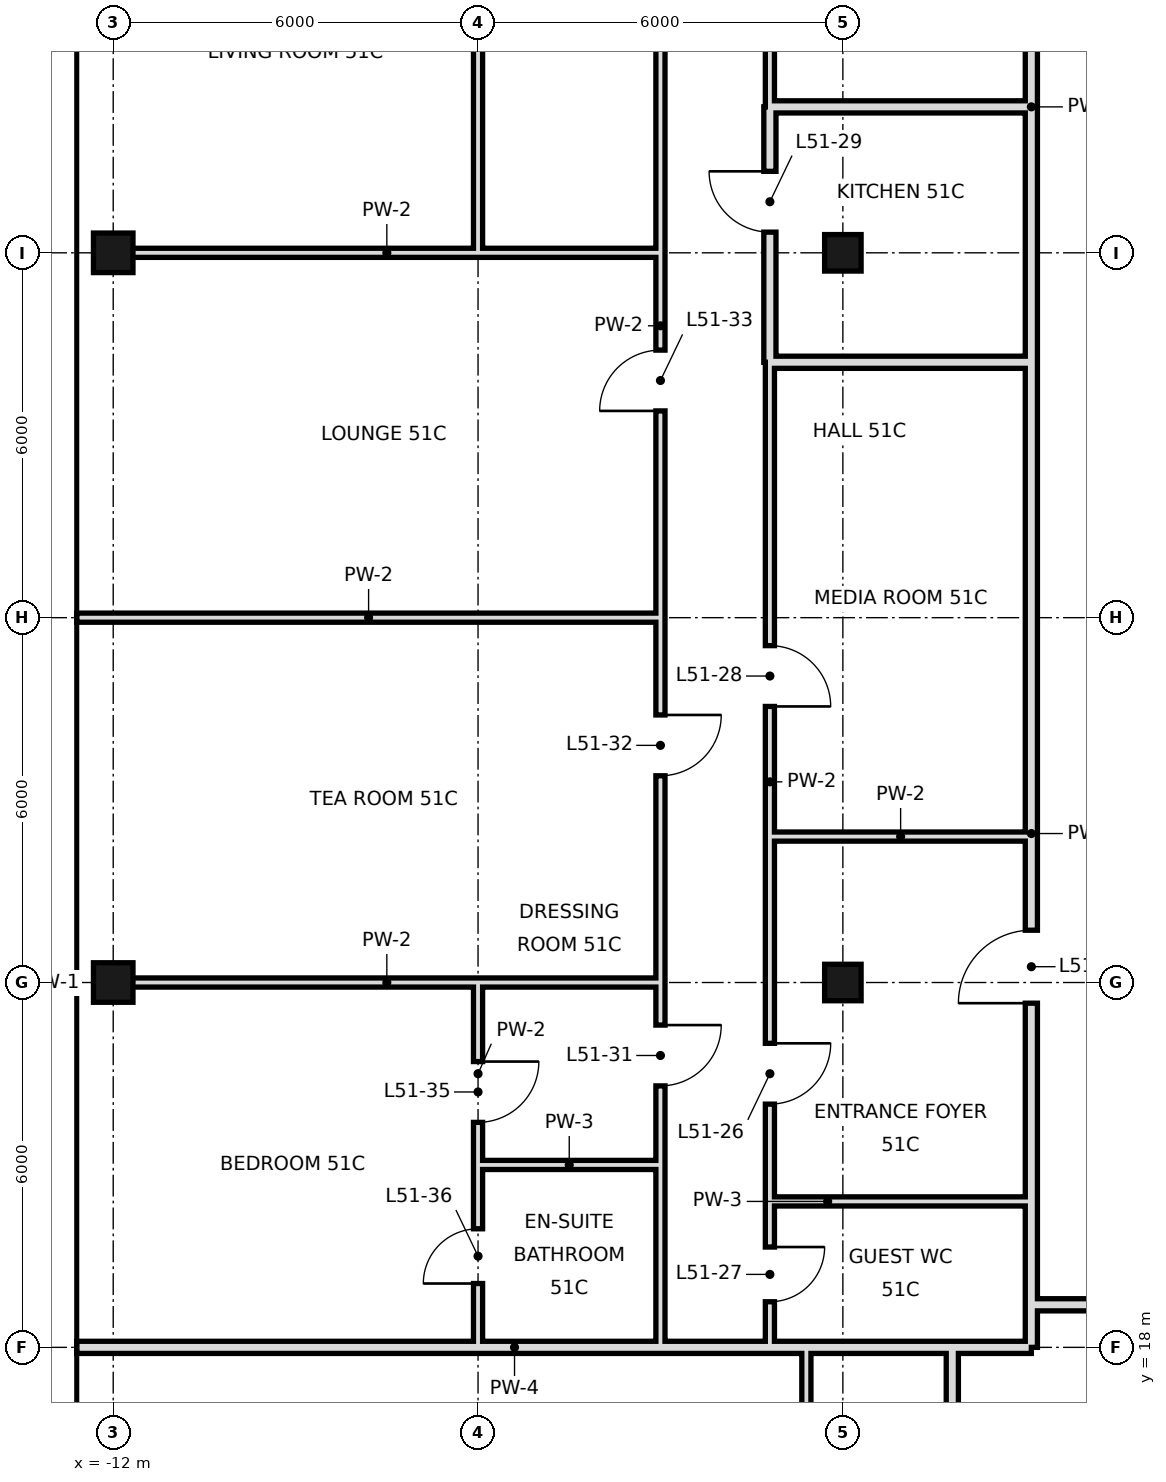
"""IFC4 building model, lengths in metres.
Left out: names, types, materials, properties, quantities, classifications, styles, units other than length and angle.
Written with IfcOpenShell. Run it as: python <this file> out.ifc"""

import sys

from ifc_helpers import new_model, si_unit, direction, frame, frame_2d, origin, origin_2d, place, context, subcontext, project, spatial, rectangle, hollow_rectangle, extrude, element, fill, save


model = new_model("IFC4")
c1 = context("Model", 3, precision=1e-05, world=origin(), true_north=direction((0.0, 1.0)))
c2 = subcontext(c1, "Body", "Model", "MODEL_VIEW")
j1 = project(units=[si_unit("LENGTHUNIT", "METRE"), si_unit("PLANEANGLEUNIT", "RADIAN")], contexts=[c1])
p1 = place(None, origin())
s1 = spatial("IfcSite", under=j1, at=p1, CompositionType="ELEMENT")
p2 = place(p1, origin())
s2 = spatial("IfcBuilding", under=s1, at=p2, CompositionType="ELEMENT")
p3 = place(p2, frame((0.0, 0.0, 219.0)))
s3 = spatial("IfcBuildingStorey", under=s2, at=p3, CompositionType="ELEMENT", Elevation=219.0)
for number, where, z_axis, x_axis in (
    (1, (-12.0, 24.0, 0.0), (0.0, 0.0, 1.0), (1.0, 0.0, 0.0)),
    (2, (-12.0, 36.0, 0.0), (0.0, 0.0, 1.0), (1.0, 0.0, 0.0)),
):
    element("IfcColumn", number, at=place(p3, frame(where, z_axis=z_axis, x_axis=x_axis)), inside=s3, PredefinedType="COLUMN", context=c2, shape_type="SweptSolid", body=[
        extrude(hollow_rectangle(XDim=0.65, YDim=0.65, WallThickness=0.032, at=origin_2d()), origin(), (0.0, 0.0, 1.0), 3.6),
    ])
for number, where, z_axis, x_axis in (
    (3, (0.0, 24.0, 0.0), (0.0, 0.0, 1.0), (1.0, 0.0, 0.0)),
    (4, (0.0, 36.0, 0.0), (0.0, 0.0, 1.0), (1.0, 0.0, 0.0)),
):
    element("IfcColumn", number, at=place(p3, frame(where, z_axis=z_axis, x_axis=x_axis)), inside=s3, PredefinedType="COLUMN", context=c2, shape_type="SweptSolid", body=[
        extrude(hollow_rectangle(XDim=0.6, YDim=0.6, WallThickness=0.028, at=origin_2d()), origin(), (0.0, 0.0, 1.0), 3.6),
    ])
p4 = place(p3, frame((-0.6, 10.8, 0.0), z_axis=(0.0, 0.0, 1.0), x_axis=(0.0, 1.0, 0.0)))
e5 = element("IfcWall", 5, at=p4, inside=s3, PredefinedType="PARTITIONING", context=c2, shape_type="SweptSolid", body=[
    extrude(rectangle(XDim=7.2, YDim=0.15, at=frame_2d((3.6, 0.0))), origin(), (0.0, 0.0, 1.0), 3.42),
])
p5 = place(p3, frame((-1.2, 34.2, 0.0), z_axis=(0.0, 0.0, 1.0), x_axis=(0.0, 1.0, 0.0)))
e6 = element("IfcWall", 6, at=p5, inside=s3, PredefinedType="SOLIDWALL", context=c2, shape_type="SweptSolid", body=[
    extrude(rectangle(XDim=4.2, YDim=0.2, at=frame_2d((2.1, 0.0))), origin(), (0.0, 0.0, 1.0), 2.72),
])
p6 = place(p5, frame((2.14, 0.0, 0.0)))
e7 = element("IfcOpeningElement", 7, at=p6, cuts=e6, PredefinedType="OPENING", context=c2, shape_type="SweptSolid", body=[
    extrude(rectangle(XDim=1.0, YDim=2.4, at=frame_2d((0.5, 1.2))), frame((0.0, 0.11, 0.0), z_axis=(0.0, -1.0, 0.0), x_axis=(1.0, 0.0, 0.0)), (0.0, 0.0, 1.0), 0.22),
])
p7 = place(p3, frame((-1.2, 20.4, 0.0), z_axis=(0.0, 0.0, 1.0), x_axis=(0.0, 1.0, 0.0)))
e8 = element("IfcWall", 8, at=p7, inside=s3, PredefinedType="PARTITIONING", context=c2, shape_type="SweptSolid", body=[
    extrude(rectangle(XDim=13.8, YDim=0.15, at=frame_2d((6.9, 0.0))), origin(), (0.0, 0.0, 1.0), 3.42),
])
p8 = place(p7, frame((1.6, 0.0, 0.0)))
e9 = element("IfcOpeningElement", 9, at=p8, cuts=e8, PredefinedType="OPENING", context=c2, shape_type="SweptSolid", body=[
    extrude(rectangle(XDim=1.0, YDim=2.4, at=frame_2d((0.5, 1.2))), frame((0.0, 0.085, 0.0), z_axis=(0.0, -1.0, 0.0), x_axis=(1.0, 0.0, 0.0)), (0.0, 0.0, 1.0), 0.17),
])
p9 = place(p7, frame((8.14, 0.0, 0.0)))
e10 = element("IfcOpeningElement", 10, at=p9, cuts=e8, PredefinedType="OPENING", context=c2, shape_type="SweptSolid", body=[
    extrude(rectangle(XDim=1.0, YDim=2.4, at=frame_2d((0.5, 1.2))), frame((0.0, 0.085, 0.0), z_axis=(0.0, -1.0, 0.0), x_axis=(1.0, 0.0, 0.0)), (0.0, 0.0, 1.0), 0.17),
])
p10 = place(p3, frame((-1.2, 38.4, 0.0), z_axis=(0.0, 0.0, 1.0), x_axis=(0.0, 1.0, 0.0)))
e11 = element("IfcWall", 11, at=p10, inside=s3, PredefinedType="PARTITIONING", context=c2, shape_type="SweptSolid", body=[
    extrude(rectangle(XDim=10.2, YDim=0.15, at=frame_2d((5.1, 0.0))), origin(), (0.0, 0.0, 1.0), 3.42),
])
p11 = place(p10, frame((5.92, 0.0, 0.0)))
e12 = element("IfcOpeningElement", 12, at=p11, cuts=e11, PredefinedType="OPENING", context=c2, shape_type="SweptSolid", body=[
    extrude(rectangle(XDim=1.0, YDim=2.4, at=frame_2d((0.5, 1.2))), frame((0.0, 0.085, 0.0), z_axis=(0.0, -1.0, 0.0), x_axis=(1.0, 0.0, 0.0)), (0.0, 0.0, 1.0), 0.17),
])
p12 = place(p3, frame((-1.2, 18.0, 0.0), z_axis=(0.0, 0.0, 1.0), x_axis=(0.0, 1.0, 0.0)))
e13 = element("IfcWall", 13, at=p12, inside=s3, PredefinedType="PARTITIONING", context=c2, shape_type="SweptSolid", body=[
    extrude(rectangle(XDim=2.4, YDim=0.15, at=frame_2d((1.2, 0.0))), origin(), (0.0, 0.0, 1.0), 3.42),
])
p13 = place(p12, frame((0.75, 0.0, 0.0)))
e14 = element("IfcOpeningElement", 14, at=p13, cuts=e13, PredefinedType="OPENING", context=c2, shape_type="SweptSolid", body=[
    extrude(rectangle(XDim=0.9, YDim=2.4, at=frame_2d((0.45, 1.2))), frame((0.0, 0.085, 0.0), z_axis=(0.0, -1.0, 0.0), x_axis=(1.0, 0.0, 0.0)), (0.0, 0.0, 1.0), 0.17),
])
p14 = place(p3, frame((-3.0, 21.0, 0.0), z_axis=(0.0, 0.0, 1.0), x_axis=(0.0, 1.0, 0.0)))
e15 = element("IfcWall", 15, at=p14, inside=s3, PredefinedType="PARTITIONING", context=c2, shape_type="SweptSolid", body=[
    extrude(rectangle(XDim=27.6, YDim=0.15, at=frame_2d((13.8, 0.0))), origin(), (0.0, 0.0, 1.0), 3.42),
])
p15 = place(p14, frame((1.3, 0.0, 0.0)))
e16 = element("IfcOpeningElement", 16, at=p15, cuts=e15, PredefinedType="OPENING", context=c2, shape_type="SweptSolid", body=[
    extrude(rectangle(XDim=1.0, YDim=2.4, at=frame_2d((0.5, 1.2))), frame((0.0, 0.085, 0.0), z_axis=(0.0, -1.0, 0.0), x_axis=(1.0, 0.0, 0.0)), (0.0, 0.0, 1.0), 0.17),
])
p16 = place(p14, frame((6.4, 0.0, 0.0)))
e17 = element("IfcOpeningElement", 17, at=p16, cuts=e15, PredefinedType="OPENING", context=c2, shape_type="SweptSolid", body=[
    extrude(rectangle(XDim=1.0, YDim=2.4, at=frame_2d((0.5, 1.2))), frame((0.0, 0.085, 0.0), z_axis=(0.0, -1.0, 0.0), x_axis=(1.0, 0.0, 0.0)), (0.0, 0.0, 1.0), 0.17),
])
p17 = place(p14, frame((12.4, 0.0, 0.0)))
e18 = element("IfcOpeningElement", 18, at=p17, cuts=e15, PredefinedType="OPENING", context=c2, shape_type="SweptSolid", body=[
    extrude(rectangle(XDim=1.0, YDim=2.4, at=frame_2d((0.5, 1.2))), frame((0.0, 0.085, 0.0), z_axis=(0.0, -1.0, 0.0), x_axis=(1.0, 0.0, 0.0)), (0.0, 0.0, 1.0), 0.17),
])
p18 = place(p14, frame((20.1, 0.0, 0.0)))
e19 = element("IfcOpeningElement", 19, at=p18, cuts=e15, PredefinedType="OPENING", context=c2, shape_type="SweptSolid", body=[
    extrude(rectangle(XDim=1.8, YDim=2.4, at=frame_2d((0.9, 1.2))), frame((0.0, 0.085, 0.0), z_axis=(0.0, -1.0, 0.0), x_axis=(1.0, 0.0, 0.0)), (0.0, 0.0, 1.0), 0.17),
])
p19 = place(p3, frame((-3.0, 18.0, 0.0), z_axis=(0.0, 0.0, 1.0), x_axis=(0.0, 1.0, 0.0)))
e20 = element("IfcWall", 20, at=p19, inside=s3, PredefinedType="PARTITIONING", context=c2, shape_type="SweptSolid", body=[
    extrude(rectangle(XDim=3.0, YDim=0.15, at=frame_2d((1.5, 0.0))), origin(), (0.0, 0.0, 1.0), 3.42),
])
p20 = place(p3, frame((-6.0, 21.0, 0.0), z_axis=(0.0, 0.0, 1.0), x_axis=(0.0, 1.0, 0.0)))
e21 = element("IfcWall", 21, at=p20, inside=s3, PredefinedType="PARTITIONING", context=c2, shape_type="SweptSolid", body=[
    extrude(rectangle(XDim=3.0, YDim=0.15, at=frame_2d((1.5, 0.0))), origin(), (0.0, 0.0, 1.0), 3.42),
])
p21 = place(p20, frame((0.7, 0.0, 0.0)))
e22 = element("IfcOpeningElement", 22, at=p21, cuts=e21, PredefinedType="OPENING", context=c2, shape_type="SweptSolid", body=[
    extrude(rectangle(XDim=1.0, YDim=2.4, at=frame_2d((0.5, 1.2))), frame((0.0, 0.085, 0.0), z_axis=(0.0, -1.0, 0.0), x_axis=(1.0, 0.0, 0.0)), (0.0, 0.0, 1.0), 0.17),
])
p22 = place(p3, frame((-6.0, 36.0, 0.0), z_axis=(0.0, 0.0, 1.0), x_axis=(0.0, 1.0, 0.0)))
e23 = element("IfcWall", 23, at=p22, inside=s3, PredefinedType="PARTITIONING", context=c2, shape_type="SweptSolid", body=[
    extrude(rectangle(XDim=12.0, YDim=0.15, at=frame_2d((6.0, 0.0))), origin(), (0.0, 0.0, 1.0), 3.42),
])
p23 = place(p22, frame((7.04, 0.0, 0.0)))
e24 = element("IfcOpeningElement", 24, at=p23, cuts=e23, PredefinedType="OPENING", context=c2, shape_type="SweptSolid", body=[
    extrude(rectangle(XDim=1.8, YDim=2.4, at=frame_2d((0.9, 1.2))), frame((0.0, 0.085, 0.0), z_axis=(0.0, -1.0, 0.0), x_axis=(1.0, 0.0, 0.0)), (0.0, 0.0, 1.0), 0.17),
])
p24 = place(p3, frame((-6.0, 18.0, 0.0), z_axis=(0.0, 0.0, 1.0), x_axis=(0.0, 1.0, 0.0)))
e25 = element("IfcWall", 25, at=p24, inside=s3, PredefinedType="PARTITIONING", context=c2, shape_type="SweptSolid", body=[
    extrude(rectangle(XDim=3.0, YDim=0.15, at=frame_2d((1.5, 0.0))), origin(), (0.0, 0.0, 1.0), 3.42),
])
p25 = place(p24, frame((1.05, 0.0, 0.0)))
e26 = element("IfcOpeningElement", 26, at=p25, cuts=e25, PredefinedType="OPENING", context=c2, shape_type="SweptSolid", body=[
    extrude(rectangle(XDim=0.9, YDim=2.4, at=frame_2d((0.45, 1.2))), frame((0.0, 0.085, 0.0), z_axis=(0.0, -1.0, 0.0), x_axis=(1.0, 0.0, 0.0)), (0.0, 0.0, 1.0), 0.17),
])
p26 = place(p3, frame((1.8, 10.8, 0.0), z_axis=(0.0, 0.0, 1.0), x_axis=(0.0, 1.0, 0.0)))
e27 = element("IfcWall", 27, at=p26, inside=s3, PredefinedType="SOLIDWALL", context=c2, shape_type="SweptSolid", body=[
    extrude(rectangle(XDim=7.2, YDim=0.2, at=frame_2d((3.6, 0.0))), origin(), (0.0, 0.0, 1.0), 3.42),
])
p27 = place(p3, frame((3.1, 18.7, 0.0), z_axis=(0.0, 0.0, 1.0), x_axis=(0.0, 1.0, 0.0)))
e28 = element("IfcWall", 28, at=p27, inside=s3, PredefinedType="SOLIDWALL", context=c2, shape_type="SweptSolid", body=[
    extrude(rectangle(XDim=15.5, YDim=0.2, at=frame_2d((7.75, 0.0))), origin(), (0.0, 0.0, 1.0), 2.97),
])
p28 = place(p27, frame((4.96, 0.0, 0.0)))
e29 = element("IfcOpeningElement", 29, at=p28, cuts=e28, PredefinedType="OPENING", context=c2, shape_type="SweptSolid", body=[
    extrude(rectangle(XDim=1.2, YDim=2.4, at=frame_2d((0.6, 1.2))), frame((0.0, 0.11, 0.0), z_axis=(0.0, -1.0, 0.0), x_axis=(1.0, 0.0, 0.0)), (0.0, 0.0, 1.0), 0.22),
])
p29 = place(p3, frame((3.1, 38.4, 0.0), z_axis=(0.0, 0.0, 1.0), x_axis=(0.0, 1.0, 0.0)))
e30 = element("IfcWall", 30, at=p29, inside=s3, PredefinedType="SOLIDWALL", context=c2, shape_type="SweptSolid", body=[
    extrude(rectangle(XDim=10.2, YDim=0.2, at=frame_2d((5.1, 0.0))), origin(), (0.0, 0.0, 1.0), 2.72),
])
p30 = place(p3, frame((3.1, 18.0, 0.0), z_axis=(0.0, 0.0, 1.0), x_axis=(0.0, 1.0, 0.0)))
e31 = element("IfcWall", 31, at=p30, inside=s3, PredefinedType="SOLIDWALL", context=c2, shape_type="SweptSolid", body=[
    extrude(rectangle(XDim=0.7, YDim=0.2, at=frame_2d((0.35, 0.0))), origin(), (0.0, 0.0, 1.0), 2.97),
])
p31 = place(p3, frame((3.1, 34.2, 0.0), z_axis=(0.0, 0.0, 1.0), x_axis=(0.0, 1.0, 0.0)))
e32 = element("IfcWall", 32, at=p31, inside=s3, PredefinedType="SOLIDWALL", context=c2, shape_type="SweptSolid", body=[
    extrude(rectangle(XDim=4.2, YDim=0.2, at=frame_2d((2.1, 0.0))), origin(), (0.0, 0.0, 1.0), 3.42),
])
p32 = place(p3, frame((1.8, 18.0, 0.0), z_axis=(0.0, 0.0, 1.0), x_axis=(1.0, 0.0, 0.0)))
e33 = element("IfcWall", 33, at=p32, inside=s3, PredefinedType="SOLIDWALL", context=c2, shape_type="SweptSolid", body=[
    extrude(rectangle(XDim=1.3, YDim=0.2, at=frame_2d((0.65, 0.0))), origin(), (0.0, 0.0, 1.0), 2.97),
])
p33 = place(p3, frame((-12.6, 18.0, 0.0), z_axis=(0.0, 0.0, 1.0), x_axis=(1.0, 0.0, 0.0)))
e34 = element("IfcWall", 34, at=p33, inside=s3, PredefinedType="SOLIDWALL", context=c2, shape_type="SweptSolid", body=[
    extrude(rectangle(XDim=14.4, YDim=0.2, at=frame_2d((7.2, 0.0))), origin(), (0.0, 0.0, 1.0), 2.72),
])
p34 = place(p3, frame((3.1, 18.7, 0.0), z_axis=(0.0, 0.0, 1.0), x_axis=(1.0, 0.0, 0.0)))
e35 = element("IfcWall", 35, at=p34, inside=s3, PredefinedType="SOLIDWALL", context=c2, shape_type="SweptSolid", body=[
    extrude(rectangle(XDim=4.1, YDim=0.2, at=frame_2d((2.05, 0.0))), origin(), (0.0, 0.0, 1.0), 2.72),
])
p35 = place(p3, frame((-1.2, 20.4, 0.0), z_axis=(0.0, 0.0, 1.0), x_axis=(1.0, 0.0, 0.0)))
e36 = element("IfcWall", 36, at=p35, inside=s3, PredefinedType="PARTITIONING", context=c2, shape_type="SweptSolid", body=[
    extrude(rectangle(XDim=4.3, YDim=0.15, at=frame_2d((2.15, 0.0))), origin(), (0.0, 0.0, 1.0), 3.42),
])
p36 = place(p3, frame((-6.0, 21.0, 0.0), z_axis=(0.0, 0.0, 1.0), x_axis=(1.0, 0.0, 0.0)))
e37 = element("IfcWall", 37, at=p36, inside=s3, PredefinedType="PARTITIONING", context=c2, shape_type="SweptSolid", body=[
    extrude(rectangle(XDim=3.0, YDim=0.15, at=frame_2d((1.5, 0.0))), origin(), (0.0, 0.0, 1.0), 3.42),
])
p37 = place(p3, frame((-12.0, 24.0, 0.0), z_axis=(0.0, 0.0, 1.0), x_axis=(1.0, 0.0, 0.0)))
e38 = element("IfcWall", 38, at=p37, inside=s3, PredefinedType="PARTITIONING", context=c2, shape_type="SweptSolid", body=[
    extrude(rectangle(XDim=9.0, YDim=0.15, at=frame_2d((4.5, 0.0))), origin(), (0.0, 0.0, 1.0), 2.72),
])
p38 = place(p3, frame((-1.2, 26.4, 0.0), z_axis=(0.0, 0.0, 1.0), x_axis=(1.0, 0.0, 0.0)))
e39 = element("IfcWall", 39, at=p38, inside=s3, PredefinedType="PARTITIONING", context=c2, shape_type="SweptSolid", body=[
    extrude(rectangle(XDim=4.3, YDim=0.15, at=frame_2d((2.15, 0.0))), origin(), (0.0, 0.0, 1.0), 3.42),
])
p39 = place(p3, frame((-12.6, 30.0, 0.0), z_axis=(0.0, 0.0, 1.0), x_axis=(1.0, 0.0, 0.0)))
e40 = element("IfcWall", 40, at=p39, inside=s3, PredefinedType="PARTITIONING", context=c2, shape_type="SweptSolid", body=[
    extrude(rectangle(XDim=9.6, YDim=0.15, at=frame_2d((4.8, 0.0))), origin(), (0.0, 0.0, 1.0), 2.72),
])
p40 = place(p3, frame((-1.2, 34.2, 0.0), z_axis=(0.0, 0.0, 1.0), x_axis=(1.0, 0.0, 0.0)))
e41 = element("IfcWall", 41, at=p40, inside=s3, PredefinedType="SOLIDWALL", context=c2, shape_type="SweptSolid", body=[
    extrude(rectangle(XDim=4.3, YDim=0.2, at=frame_2d((2.15, 0.0))), origin(), (0.0, 0.0, 1.0), 2.72),
])
p41 = place(p3, frame((-12.0, 36.0, 0.0), z_axis=(0.0, 0.0, 1.0), x_axis=(1.0, 0.0, 0.0)))
e42 = element("IfcWall", 42, at=p41, inside=s3, PredefinedType="PARTITIONING", context=c2, shape_type="SweptSolid", body=[
    extrude(rectangle(XDim=9.0, YDim=0.15, at=frame_2d((4.5, 0.0))), origin(), (0.0, 0.0, 1.0), 2.72),
])
p42 = place(p3, frame((-1.2, 38.4, 0.0), z_axis=(0.0, 0.0, 1.0), x_axis=(1.0, 0.0, 0.0)))
e43 = element("IfcWall", 43, at=p42, inside=s3, PredefinedType="SOLIDWALL", context=c2, shape_type="SweptSolid", body=[
    extrude(rectangle(XDim=4.3, YDim=0.2, at=frame_2d((2.15, 0.0))), origin(), (0.0, 0.0, 1.0), 2.72),
])
p43 = place(p8, origin())
e44 = element("IfcDoor", 44, at=p43, inside=s3, OperationType="SINGLE_SWING_RIGHT", PredefinedType="DOOR", context=c2, shape_type="SweptSolid", body=[
    extrude(rectangle(XDim=1.0, YDim=2.4, at=frame_2d((0.5, 1.2))), frame((0.0, 0.025, 0.0), z_axis=(0.0, -1.0, 0.0), x_axis=(1.0, 0.0, 0.0)), (0.0, 0.0, 1.0), 0.05),
])
fill(e9, e44)
p44 = place(p13, origin())
e45 = element("IfcDoor", 45, at=p44, inside=s3, OperationType="SINGLE_SWING_RIGHT", PredefinedType="DOOR", context=c2, shape_type="SweptSolid", body=[
    extrude(rectangle(XDim=0.9, YDim=2.4, at=frame_2d((0.45, 1.2))), frame((0.0, 0.025, 0.0), z_axis=(0.0, -1.0, 0.0), x_axis=(1.0, 0.0, 0.0)), (0.0, 0.0, 1.0), 0.05),
])
fill(e14, e45)
p45 = place(p9, frame((1.0, 0.0, 0.0), z_axis=(0.0, 0.0, 1.0), x_axis=(-1.0, 0.0, 0.0)))
e46 = element("IfcDoor", 46, at=p45, inside=s3, OperationType="SINGLE_SWING_RIGHT", PredefinedType="DOOR", context=c2, shape_type="SweptSolid", body=[
    extrude(rectangle(XDim=1.0, YDim=2.4, at=frame_2d((0.5, 1.2))), frame((0.0, 0.025, 0.0), z_axis=(0.0, -1.0, 0.0), x_axis=(1.0, 0.0, 0.0)), (0.0, 0.0, 1.0), 0.05),
])
fill(e10, e46)
p46 = place(p6, frame((1.0, 0.0, 0.0), z_axis=(0.0, 0.0, 1.0), x_axis=(-1.0, 0.0, 0.0)))
e47 = element("IfcDoor", 47, at=p46, inside=s3, OperationType="SINGLE_SWING_LEFT", PredefinedType="DOOR", context=c2, shape_type="SweptSolid", body=[
    extrude(rectangle(XDim=1.0, YDim=2.4, at=frame_2d((0.5, 1.2))), frame((0.0, 0.025, 0.0), z_axis=(0.0, -1.0, 0.0), x_axis=(1.0, 0.0, 0.0)), (0.0, 0.0, 1.0), 0.05),
])
fill(e7, e47)
p47 = place(p15, origin())
e48 = element("IfcDoor", 48, at=p47, inside=s3, OperationType="SINGLE_SWING_RIGHT", PredefinedType="DOOR", context=c2, shape_type="SweptSolid", body=[
    extrude(rectangle(XDim=1.0, YDim=2.4, at=frame_2d((0.5, 1.2))), frame((0.0, 0.025, 0.0), z_axis=(0.0, -1.0, 0.0), x_axis=(1.0, 0.0, 0.0)), (0.0, 0.0, 1.0), 0.05),
])
fill(e16, e48)
p48 = place(p16, origin())
e49 = element("IfcDoor", 49, at=p48, inside=s3, OperationType="SINGLE_SWING_RIGHT", PredefinedType="DOOR", context=c2, shape_type="SweptSolid", body=[
    extrude(rectangle(XDim=1.0, YDim=2.4, at=frame_2d((0.5, 1.2))), frame((0.0, 0.025, 0.0), z_axis=(0.0, -1.0, 0.0), x_axis=(1.0, 0.0, 0.0)), (0.0, 0.0, 1.0), 0.05),
])
fill(e17, e49)
p49 = place(p17, origin())
e50 = element("IfcDoor", 50, at=p49, inside=s3, OperationType="SINGLE_SWING_LEFT", PredefinedType="DOOR", context=c2, shape_type="SweptSolid", body=[
    extrude(rectangle(XDim=1.0, YDim=2.4, at=frame_2d((0.5, 1.2))), frame((0.0, 0.025, 0.0), z_axis=(0.0, -1.0, 0.0), x_axis=(1.0, 0.0, 0.0)), (0.0, 0.0, 1.0), 0.05),
])
fill(e18, e50)
p50 = place(p21, origin())
e51 = element("IfcDoor", 51, at=p50, inside=s3, OperationType="SINGLE_SWING_RIGHT", PredefinedType="DOOR", context=c2, shape_type="SweptSolid", body=[
    extrude(rectangle(XDim=1.0, YDim=2.4, at=frame_2d((0.5, 1.2))), frame((0.0, 0.025, 0.0), z_axis=(0.0, -1.0, 0.0), x_axis=(1.0, 0.0, 0.0)), (0.0, 0.0, 1.0), 0.05),
])
fill(e22, e51)
p51 = place(p25, origin())
e52 = element("IfcDoor", 52, at=p51, inside=s3, OperationType="SINGLE_SWING_LEFT", PredefinedType="DOOR", context=c2, shape_type="SweptSolid", body=[
    extrude(rectangle(XDim=0.9, YDim=2.4, at=frame_2d((0.45, 1.2))), frame((0.0, 0.025, 0.0), z_axis=(0.0, -1.0, 0.0), x_axis=(1.0, 0.0, 0.0)), (0.0, 0.0, 1.0), 0.05),
])
fill(e26, e52)
p52 = place(p28, origin())
e53 = element("IfcDoor", 53, at=p52, inside=s3, OperationType="SINGLE_SWING_LEFT", PredefinedType="DOOR", context=c2, shape_type="SweptSolid", body=[
    extrude(rectangle(XDim=1.2, YDim=2.4, at=frame_2d((0.6, 1.2))), frame((0.0, 0.025, 0.0), z_axis=(0.0, -1.0, 0.0), x_axis=(1.0, 0.0, 0.0)), (0.0, 0.0, 1.0), 0.05),
])
fill(e29, e53)
save(model, sys.argv[1])
